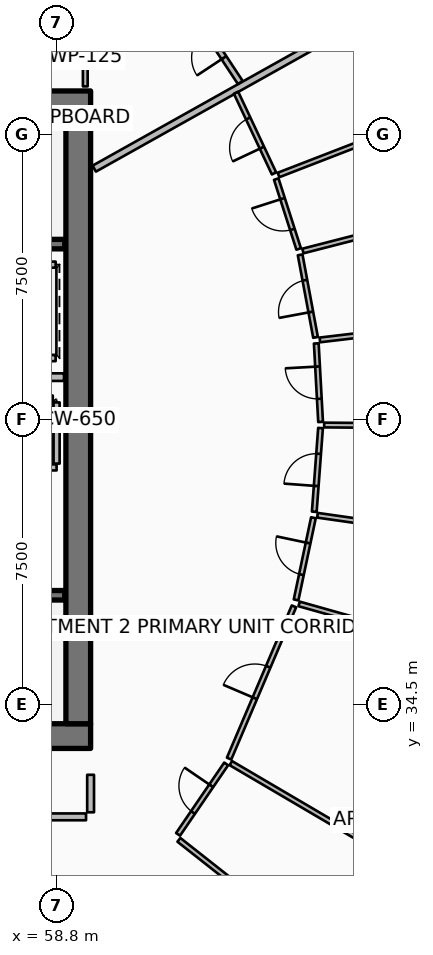
"""IFC4 building model, lengths in metres.
Left out: names, types, materials, properties, quantities, classifications, styles, units other than length and angle.
Written with IfcOpenShell. Run it as: python <this file> out.ifc"""

import sys

from ifc_helpers import new_model, si_unit, direction, frame, frame_2d, origin, place, context, subcontext, project, spatial, rectangle, extrude, element, fill, save


model = new_model("IFC4")
c1 = context("Model", 3, precision=1e-05, world=origin(), true_north=direction((0.0, 1.0)))
c2 = subcontext(c1, "Body", "Model", "MODEL_VIEW")
j1 = project(units=[si_unit("LENGTHUNIT", "METRE"), si_unit("PLANEANGLEUNIT", "RADIAN")], contexts=[c1])
p1 = place(None, origin())
s1 = spatial("IfcSite", under=j1, at=p1, CompositionType="ELEMENT")
p2 = place(p1, origin())
s2 = spatial("IfcBuilding", under=s1, at=p2, CompositionType="ELEMENT")
p3 = place(p2, frame((0.0, 0.0, 248.25)))
s3 = spatial("IfcBuildingStorey", under=s2, at=p3, CompositionType="ELEMENT", Elevation=248.25)
for number, where, z_axis, x_axis in (
    (1, (49.95, 33.675, 0.0), (0.0, 0.0, 1.0), (1.0, 0.0, 0.0)),
    (2, (49.95, 50.325, 0.0), (0.0, 0.0, 1.0), (1.0, 0.0, 0.0)),
):
    element("IfcWall", number, at=place(p3, frame(where, z_axis=z_axis, x_axis=x_axis)), inside=s3, PredefinedType="SHEAR", context=c2, shape_type="SweptSolid", body=[
        extrude(rectangle(XDim=9.75, YDim=0.65, at=frame_2d((4.875, 0.0))), origin(), (0.0, 0.0, 1.0), 3.85),
    ])
p4 = place(p3, frame((59.375, 34.0, 0.0), z_axis=(0.0, 0.0, 1.0), x_axis=(0.0, 1.0, 0.0)))
e3 = element("IfcWall", 3, at=p4, inside=s3, PredefinedType="SHEAR", context=c2, shape_type="SweptSolid", body=[
    extrude(rectangle(XDim=16.0, YDim=0.65, at=frame_2d((8.0, 0.0))), origin(), (0.0, 0.0, 1.0), 3.85),
])
p5 = place(p3, frame((51.48, 46.62, 0.0), z_axis=(0.0, 0.0, 1.0), x_axis=(1.0, 0.0, 0.0)))
e4 = element("IfcWall", 4, at=p5, inside=s3, PredefinedType="SOLIDWALL", context=c2, shape_type="SweptSolid", body=[
    extrude(rectangle(XDim=7.54, YDim=0.25, at=frame_2d((3.77, 0.0))), origin(), (0.0, 0.0, 1.0), 3.59),
])
p6 = place(p5, frame((0.3, 0.0, 0.0)))
e5 = element("IfcOpeningElement", 5, at=p6, cuts=e4, PredefinedType="OPENING", context=c2, shape_type="SweptSolid", body=[
    extrude(rectangle(XDim=1.55, YDim=2.15, at=frame_2d((0.775, 1.075))), frame((0.0, 0.135, 0.0), z_axis=(0.0, -1.0, 0.0), x_axis=(1.0, 0.0, 0.0)), (0.0, 0.0, 1.0), 0.27),
])
p7 = place(p3, frame((51.48, 37.38, 0.0), z_axis=(0.0, 0.0, 1.0), x_axis=(1.0, 0.0, 0.0)))
e6 = element("IfcWall", 6, at=p7, inside=s3, PredefinedType="SOLIDWALL", context=c2, shape_type="SweptSolid", body=[
    extrude(rectangle(XDim=7.54, YDim=0.25, at=frame_2d((3.77, 0.0))), origin(), (0.0, 0.0, 1.0), 3.59),
])
p8 = place(p7, frame((0.3, 0.0, 0.0)))
e7 = element("IfcOpeningElement", 7, at=p8, cuts=e6, PredefinedType="OPENING", context=c2, shape_type="SweptSolid", body=[
    extrude(rectangle(XDim=1.55, YDim=2.15, at=frame_2d((0.775, 1.075))), frame((0.0, 0.135, 0.0), z_axis=(0.0, -1.0, 0.0), x_axis=(1.0, 0.0, 0.0)), (0.0, 0.0, 1.0), 0.27),
])
p9 = place(p3, frame((58.805, 40.745, 0.0), z_axis=(0.0, 0.0, 1.0), x_axis=(-1.0, 0.0, 0.0)))
e8 = element("IfcWall", 8, at=p9, inside=s3, PredefinedType="PARTITIONING", context=c2, shape_type="SweptSolid", body=[
    extrude(rectangle(XDim=2.11, YDim=0.16, at=frame_2d((1.055, 0.0))), origin(), (0.0, 0.0, 1.0), 3.59),
])
p10 = place(p9, frame((0.505, 0.0, 0.0)))
e9 = element("IfcOpeningElement", 9, at=p10, cuts=e8, PredefinedType="OPENING", context=c2, shape_type="SweptSolid", body=[
    extrude(rectangle(XDim=1.1, YDim=2.1, at=frame_2d((0.55, 1.05))), frame((0.0, 0.09, 0.0), z_axis=(0.0, -1.0, 0.0), x_axis=(1.0, 0.0, 0.0)), (0.0, 0.0, 1.0), 0.18),
])
p11 = place(p3, frame((58.805, 40.845, 0.0), z_axis=(0.0, 0.0, 1.0), x_axis=(0.0, 1.0, 0.0)))
e10 = element("IfcWall", 10, at=p11, inside=s3, PredefinedType="PARTITIONING", context=c2, shape_type="SweptSolid", body=[
    extrude(rectangle(XDim=1.61, YDim=0.16, at=frame_2d((0.805, 0.0))), origin(), (0.0, 0.0, 1.0), 3.59),
])
p12 = place(p3, frame((56.795, 42.555, 0.0), z_axis=(0.0, 0.0, 1.0), x_axis=(1.0, 0.0, 0.0)))
e11 = element("IfcWall", 11, at=p12, inside=s3, PredefinedType="PARTITIONING", context=c2, shape_type="SweptSolid", body=[
    extrude(rectangle(XDim=1.91, YDim=0.16, at=frame_2d((0.955, 0.0))), origin(), (0.0, 0.0, 1.0), 3.59),
])
for number, where, z_axis, x_axis in (
    (12, (56.72, 46.08, 0.0), (0.0, 0.0, 1.0), (1.0, 0.0, 0.0)),
    (13, (56.72, 43.62, 0.0), (0.0, 0.0, 1.0), (1.0, 0.0, 0.0)),
):
    element("IfcWall", number, at=place(p3, frame(where, z_axis=z_axis, x_axis=x_axis)), inside=s3, PredefinedType="PARTITIONING", context=c2, shape_type="SweptSolid", body=[
        extrude(rectangle(XDim=2.06, YDim=0.16, at=frame_2d((1.03, 0.0))), origin(), (0.0, 0.0, 1.0), 3.59),
    ])
p13 = place(p3, frame((50.12, 43.12, 0.0), z_axis=(0.0, 0.0, 1.0), x_axis=(1.0, 0.0, 0.0)))
e14 = element("IfcWall", 14, at=p13, inside=s3, PredefinedType="PARTITIONING", context=c2, shape_type="SweptSolid", body=[
    extrude(rectangle(XDim=8.88, YDim=0.2, at=frame_2d((4.44, 0.0))), origin(), (0.0, 0.0, 1.0), 3.59),
])
p14 = place(p3, frame((59.56, 50.77, 0.0), z_axis=(0.0, 0.0, 1.0), x_axis=(0.0, 1.0, 0.0)))
e15 = element("IfcWall", 15, at=p14, inside=s3, PredefinedType="PARTITIONING", context=c2, shape_type="SweptSolid", body=[
    extrude(rectangle(XDim=1.54, YDim=0.125, at=frame_2d((0.77, 0.0))), origin(), (0.0, 0.0, 1.0), 3.03),
])
p15 = place(p3, frame((59.796, 48.606, 0.0), z_axis=(0.0, 0.0, 1.0), x_axis=(0.872493213488, 0.488626229767, 0.0)))
e16 = element("IfcWall", 16, at=p15, inside=s3, PredefinedType="PARTITIONING", context=c2, shape_type="SweptSolid", body=[
    extrude(rectangle(XDim=16.91, YDim=0.18, at=frame_2d((8.455, 0.0))), origin(), (0.0, 0.0, 1.0), 2.957),
])
p16 = place(p3, frame((63.639, 50.872, 0.0), z_axis=(0.0, 0.0, 1.0), x_axis=(-0.550539267926, 0.834809268319, 0.0)))
e17 = element("IfcWall", 17, at=p16, inside=s3, PredefinedType="PARTITIONING", context=c2, shape_type="SweptSolid", body=[
    extrude(rectangle(XDim=2.414, YDim=0.15, at=frame_2d((1.207, 0.0))), origin(), (0.0, 0.0, 1.0), 2.957),
])
p17 = place(p16, frame((0.782, 0.0, 0.0)))
e18 = element("IfcOpeningElement", 18, at=p17, cuts=e17, PredefinedType="OPENING", context=c2, shape_type="SweptSolid", body=[
    extrude(rectangle(XDim=0.85, YDim=2.06, at=frame_2d((0.425, 1.03))), frame((0.0, 0.085, 0.0), z_axis=(0.0, -1.0, 0.0), x_axis=(1.0, 0.0, 0.0)), (0.0, 0.0, 1.0), 0.17),
])
p18 = place(p3, frame((53.972, 31.55, 0.0), z_axis=(0.0, 0.0, 1.0), x_axis=(1.0, 0.0, 0.0)))
e19 = element("IfcWall", 19, at=p18, inside=s3, PredefinedType="PARTITIONING", context=c2, shape_type="SweptSolid", body=[
    extrude(rectangle(XDim=5.608, YDim=0.18, at=frame_2d((2.804, 0.0))), origin(), (0.0, 0.0, 1.0), 2.957),
])
p19 = place(p18, frame((2.254, 0.0, 0.0)))
e20 = element("IfcOpeningElement", 20, at=p19, cuts=e19, PredefinedType="OPENING", context=c2, shape_type="SweptSolid", body=[
    extrude(rectangle(XDim=1.1, YDim=2.1, at=frame_2d((0.55, 1.05))), frame((0.0, 0.1, 0.0), z_axis=(0.0, -1.0, 0.0), x_axis=(1.0, 0.0, 0.0)), (0.0, 0.0, 1.0), 0.2),
])
p20 = place(p3, frame((59.7, 31.67, 0.0), z_axis=(0.0, 0.0, 1.0), x_axis=(0.0, 1.0, 0.0)))
e21 = element("IfcWall", 21, at=p20, inside=s3, PredefinedType="PARTITIONING", context=c2, shape_type="SweptSolid", body=[
    extrude(rectangle(XDim=0.987, YDim=0.18, at=frame_2d((0.493, 0.0))), origin(), (0.0, 0.0, 1.0), 2.957),
])
p21 = place(p3, frame((62.023, 30.945, 0.0), z_axis=(0.0, 0.0, 1.0), x_axis=(0.785322102606, -0.619087388952, 0.0)))
e22 = element("IfcWall", 22, at=p21, inside=s3, PredefinedType="PARTITIONING", context=c2, shape_type="SweptSolid", body=[
    extrude(rectangle(XDim=9.228, YDim=0.125, at=frame_2d((4.614, 0.0))), origin(), (0.0, 0.0, 1.0), 2.957),
])
p22 = place(p3, frame((63.39, 32.963, 0.0), z_axis=(0.0, 0.0, 1.0), x_axis=(0.862331921897, -0.506343417532, 0.0)))
e23 = element("IfcWall", 23, at=p22, inside=s3, PredefinedType="PARTITIONING", context=c2, shape_type="SweptSolid", body=[
    extrude(rectangle(XDim=9.478, YDim=0.125, at=frame_2d((4.739, 0.0))), origin(), (0.0, 0.0, 1.0), 3.03),
])
p23 = place(p3, frame((62.001, 31.089, 0.0), z_axis=(0.0, 0.0, 1.0), x_axis=(0.564052095913, 0.825739204044, 0.0)))
e24 = element("IfcWall", 24, at=p23, inside=s3, PredefinedType="PARTITIONING", context=c2, shape_type="SweptSolid", body=[
    extrude(rectangle(XDim=2.245, YDim=0.125, at=frame_2d((1.122, 0.0))), origin(), (0.0, 0.0, 1.0), 2.957),
])
p24 = place(p23, frame((0.698, 0.0, 0.0)))
e25 = element("IfcOpeningElement", 25, at=p24, cuts=e24, PredefinedType="OPENING", context=c2, shape_type="SweptSolid", body=[
    extrude(rectangle(XDim=0.85, YDim=2.06, at=frame_2d((0.425, 1.03))), frame((0.0, 0.073, 0.0), z_axis=(0.0, -1.0, 0.0), x_axis=(1.0, 0.0, 0.0)), (0.0, 0.0, 1.0), 0.145),
])
p25 = place(p3, frame((63.344, 33.083, 0.0), z_axis=(0.0, 0.0, 1.0), x_axis=(0.392064212371, 0.919937852998, 0.0)))
e26 = element("IfcWall", 26, at=p25, inside=s3, PredefinedType="PARTITIONING", context=c2, shape_type="SweptSolid", body=[
    extrude(rectangle(XDim=4.354, YDim=0.125, at=frame_2d((2.177, 0.0))), origin(), (0.0, 0.0, 1.0), 2.957),
])
p26 = place(p25, frame((1.727, 0.0, 0.0)))
e27 = element("IfcOpeningElement", 27, at=p26, cuts=e26, PredefinedType="OPENING", context=c2, shape_type="SweptSolid", body=[
    extrude(rectangle(XDim=0.9, YDim=2.08, at=frame_2d((0.45, 1.04))), frame((0.0, 0.073, 0.0), z_axis=(0.0, -1.0, 0.0), x_axis=(1.0, 0.0, 0.0)), (0.0, 0.0, 1.0), 0.145),
])
p27 = place(p3, frame((65.187, 37.153, 0.0), z_axis=(0.0, 0.0, 1.0), x_axis=(0.962455577867, -0.271439239301, 0.0)))
e28 = element("IfcWall", 28, at=p27, inside=s3, PredefinedType="PARTITIONING", context=c2, shape_type="SweptSolid", body=[
    extrude(rectangle(XDim=11.639, YDim=0.125, at=frame_2d((5.819, 0.0))), origin(), (0.0, 0.0, 1.0), 2.957),
])
p28 = place(p3, frame((65.669, 39.485, 0.0), z_axis=(0.0, 0.0, 1.0), x_axis=(0.990022432034, -0.140909843761, 0.0)))
e29 = element("IfcWall", 29, at=p28, inside=s3, PredefinedType="PARTITIONING", context=c2, shape_type="SweptSolid", body=[
    extrude(rectangle(XDim=11.761, YDim=0.125, at=frame_2d((5.88, 0.0))), origin(), (0.0, 0.0, 1.0), 3.03),
])
p29 = place(p3, frame((65.846, 41.86, 0.0), z_axis=(0.0, 0.0, 1.0), x_axis=(0.999969162233, -0.007853316706, 0.0)))
e30 = element("IfcWall", 30, at=p29, inside=s3, PredefinedType="PARTITIONING", context=c2, shape_type="SweptSolid", body=[
    extrude(rectangle(XDim=12.311, YDim=0.125, at=frame_2d((6.155, 0.0))), origin(), (0.0, 0.0, 1.0), 3.03),
])
p30 = place(p3, frame((65.107, 37.258, 0.0), z_axis=(0.0, 0.0, 1.0), x_axis=(0.20677346991, 0.978388845062, 0.0)))
e31 = element("IfcWall", 31, at=p30, inside=s3, PredefinedType="PARTITIONING", context=c2, shape_type="SweptSolid", body=[
    extrude(rectangle(XDim=2.209, YDim=0.125, at=frame_2d((1.104, 0.0))), origin(), (0.0, 0.0, 1.0), 2.957),
])
p31 = place(p30, frame((0.68, 0.0, 0.0)))
e32 = element("IfcOpeningElement", 32, at=p31, cuts=e31, PredefinedType="OPENING", context=c2, shape_type="SweptSolid", body=[
    extrude(rectangle(XDim=0.85, YDim=2.06, at=frame_2d((0.425, 1.03))), frame((0.0, 0.073, 0.0), z_axis=(0.0, -1.0, 0.0), x_axis=(1.0, 0.0, 0.0)), (0.0, 0.0, 1.0), 0.145),
])
p32 = place(p3, frame((65.586, 39.578, 0.0), z_axis=(0.0, 0.0, 1.0), x_axis=(0.074490462528, 0.997221726093, 0.0)))
e33 = element("IfcWall", 33, at=p32, inside=s3, PredefinedType="PARTITIONING", context=c2, shape_type="SweptSolid", body=[
    extrude(rectangle(XDim=2.209, YDim=0.125, at=frame_2d((1.104, 0.0))), origin(), (0.0, 0.0, 1.0), 3.03),
])
p33 = place(p32, frame((0.679, 0.0, 0.0)))
e34 = element("IfcOpeningElement", 34, at=p33, cuts=e33, PredefinedType="OPENING", context=c2, shape_type="SweptSolid", body=[
    extrude(rectangle(XDim=0.85, YDim=2.06, at=frame_2d((0.425, 1.03))), frame((0.0, 0.073, 0.0), z_axis=(0.0, -1.0, 0.0), x_axis=(1.0, 0.0, 0.0)), (0.0, 0.0, 1.0), 0.145),
])
p34 = place(p3, frame((65.752, 41.94, 0.0), z_axis=(0.0, 0.0, 1.0), x_axis=(-0.055084577693, 0.998481692021, 0.0)))
e35 = element("IfcWall", 35, at=p34, inside=s3, PredefinedType="PARTITIONING", context=c2, shape_type="SweptSolid", body=[
    extrude(rectangle(XDim=2.07, YDim=0.125, at=frame_2d((1.035, 0.0))), origin(), (0.0, 0.0, 1.0), 2.957),
])
p35 = place(p34, frame((0.61, 0.0, 0.0)))
e36 = element("IfcOpeningElement", 36, at=p35, cuts=e35, PredefinedType="OPENING", context=c2, shape_type="SweptSolid", body=[
    extrude(rectangle(XDim=0.85, YDim=2.06, at=frame_2d((0.425, 1.03))), frame((0.0, 0.073, 0.0), z_axis=(0.0, -1.0, 0.0), x_axis=(1.0, 0.0, 0.0)), (0.0, 0.0, 1.0), 0.145),
])
p36 = place(p3, frame((65.733, 44.099, 0.0), z_axis=(0.0, 0.0, 1.0), x_axis=(0.99306831242, 0.117538618625, 0.0)))
e37 = element("IfcWall", 37, at=p36, inside=s3, PredefinedType="PARTITIONING", context=c2, shape_type="SweptSolid", body=[
    extrude(rectangle(XDim=12.573, YDim=0.125, at=frame_2d((6.286, 0.0))), origin(), (0.0, 0.0, 1.0), 2.957),
])
p37 = place(p3, frame((65.286, 46.438, 0.0), z_axis=(0.0, 0.0, 1.0), x_axis=(0.968583991447, 0.248686653265, 0.0)))
e38 = element("IfcWall", 38, at=p37, inside=s3, PredefinedType="PARTITIONING", context=c2, shape_type="SweptSolid", body=[
    extrude(rectangle(XDim=12.056, YDim=0.125, at=frame_2d((6.028, 0.0))), origin(), (0.0, 0.0, 1.0), 3.03),
])
p38 = place(p3, frame((64.645, 48.439, 0.0), z_axis=(0.0, 0.0, 1.0), x_axis=(0.93263897003, 0.360810963778, 0.0)))
e39 = element("IfcWall", 39, at=p38, inside=s3, PredefinedType="PARTITIONING", context=c2, shape_type="SweptSolid", body=[
    extrude(rectangle(XDim=12.043, YDim=0.125, at=frame_2d((6.021, 0.0))), origin(), (0.0, 0.0, 1.0), 3.03),
])
p39 = place(p3, frame((65.619, 44.166, 0.0), z_axis=(0.0, 0.0, 1.0), x_axis=(-0.183454395516, 0.983028221755, 0.0)))
e40 = element("IfcWall", 40, at=p39, inside=s3, PredefinedType="PARTITIONING", context=c2, shape_type="SweptSolid", body=[
    extrude(rectangle(XDim=2.209, YDim=0.125, at=frame_2d((1.104, 0.0))), origin(), (0.0, 0.0, 1.0), 2.957),
])
p40 = place(p39, frame((0.68, 0.0, 0.0)))
e41 = element("IfcOpeningElement", 41, at=p40, cuts=e40, PredefinedType="OPENING", context=c2, shape_type="SweptSolid", body=[
    extrude(rectangle(XDim=0.85, YDim=2.06, at=frame_2d((0.425, 1.03))), frame((0.0, 0.073, 0.0), z_axis=(0.0, -1.0, 0.0), x_axis=(1.0, 0.0, 0.0)), (0.0, 0.0, 1.0), 0.145),
])
p41 = place(p3, frame((65.175, 46.492, 0.0), z_axis=(0.0, 0.0, 1.0), x_axis=(-0.305358332679, 0.952237516938, 0.0)))
e42 = element("IfcWall", 42, at=p41, inside=s3, PredefinedType="PARTITIONING", context=c2, shape_type="SweptSolid", body=[
    extrude(rectangle(XDim=1.931, YDim=0.125, at=frame_2d((0.965, 0.0))), origin(), (0.0, 0.0, 1.0), 3.03),
])
p42 = place(p41, frame((0.54, 0.0, 0.0)))
e43 = element("IfcOpeningElement", 43, at=p42, cuts=e42, PredefinedType="OPENING", context=c2, shape_type="SweptSolid", body=[
    extrude(rectangle(XDim=0.85, YDim=2.06, at=frame_2d((0.425, 1.03))), frame((0.0, 0.073, 0.0), z_axis=(0.0, -1.0, 0.0), x_axis=(1.0, 0.0, 0.0)), (0.0, 0.0, 1.0), 0.145),
])
p43 = place(p3, frame((64.527, 48.479, 0.0), z_axis=(0.0, 0.0, 1.0), x_axis=(-0.425751972865, 0.904839907167, 0.0)))
e44 = element("IfcWall", 44, at=p43, inside=s3, PredefinedType="PARTITIONING", context=c2, shape_type="SweptSolid", body=[
    extrude(rectangle(XDim=2.348, YDim=0.125, at=frame_2d((1.174, 0.0))), origin(), (0.0, 0.0, 1.0), 2.957),
])
p44 = place(p43, frame((0.749, 0.0, 0.0)))
e45 = element("IfcOpeningElement", 45, at=p44, cuts=e44, PredefinedType="OPENING", context=c2, shape_type="SweptSolid", body=[
    extrude(rectangle(XDim=0.85, YDim=2.06, at=frame_2d((0.425, 1.03))), frame((0.0, 0.073, 0.0), z_axis=(0.0, -1.0, 0.0), x_axis=(1.0, 0.0, 0.0)), (0.0, 0.0, 1.0), 0.145),
])
p45 = place(p17, origin())
e46 = element("IfcDoor", 46, at=p45, inside=s3, OperationType="SINGLE_SWING_LEFT", PredefinedType="DOOR", context=c2, shape_type="SweptSolid", body=[
    extrude(rectangle(XDim=0.85, YDim=2.06, at=frame_2d((0.425, 1.03))), frame((0.0, 0.025, 0.0), z_axis=(0.0, -1.0, 0.0), x_axis=(1.0, 0.0, 0.0)), (0.0, 0.0, 1.0), 0.05),
])
fill(e18, e46)
p46 = place(p24, origin())
e47 = element("IfcDoor", 47, at=p46, inside=s3, OperationType="SINGLE_SWING_RIGHT", PredefinedType="DOOR", context=c2, shape_type="SweptSolid", body=[
    extrude(rectangle(XDim=0.85, YDim=2.06, at=frame_2d((0.425, 1.03))), frame((0.0, 0.025, 0.0), z_axis=(0.0, -1.0, 0.0), x_axis=(1.0, 0.0, 0.0)), (0.0, 0.0, 1.0), 0.05),
])
fill(e25, e47)
p47 = place(p26, origin())
e48 = element("IfcDoor", 48, at=p47, inside=s3, OperationType="SINGLE_SWING_LEFT", PredefinedType="DOOR", context=c2, shape_type="SweptSolid", body=[
    extrude(rectangle(XDim=0.9, YDim=2.08, at=frame_2d((0.45, 1.04))), frame((0.0, 0.025, 0.0), z_axis=(0.0, -1.0, 0.0), x_axis=(1.0, 0.0, 0.0)), (0.0, 0.0, 1.0), 0.05),
])
fill(e27, e48)
p48 = place(p31, origin())
e49 = element("IfcDoor", 49, at=p48, inside=s3, OperationType="SINGLE_SWING_RIGHT", PredefinedType="DOOR", context=c2, shape_type="SweptSolid", body=[
    extrude(rectangle(XDim=0.85, YDim=2.06, at=frame_2d((0.425, 1.03))), frame((0.0, 0.025, 0.0), z_axis=(0.0, -1.0, 0.0), x_axis=(1.0, 0.0, 0.0)), (0.0, 0.0, 1.0), 0.05),
])
fill(e32, e49)
p49 = place(p33, origin())
e50 = element("IfcDoor", 50, at=p49, inside=s3, OperationType="SINGLE_SWING_LEFT", PredefinedType="DOOR", context=c2, shape_type="SweptSolid", body=[
    extrude(rectangle(XDim=0.85, YDim=2.06, at=frame_2d((0.425, 1.03))), frame((0.0, 0.025, 0.0), z_axis=(0.0, -1.0, 0.0), x_axis=(1.0, 0.0, 0.0)), (0.0, 0.0, 1.0), 0.05),
])
fill(e34, e50)
p50 = place(p35, origin())
e51 = element("IfcDoor", 51, at=p50, inside=s3, OperationType="SINGLE_SWING_RIGHT", PredefinedType="DOOR", context=c2, shape_type="SweptSolid", body=[
    extrude(rectangle(XDim=0.85, YDim=2.06, at=frame_2d((0.425, 1.03))), frame((0.0, 0.025, 0.0), z_axis=(0.0, -1.0, 0.0), x_axis=(1.0, 0.0, 0.0)), (0.0, 0.0, 1.0), 0.05),
])
fill(e36, e51)
p51 = place(p40, origin())
e52 = element("IfcDoor", 52, at=p51, inside=s3, OperationType="SINGLE_SWING_LEFT", PredefinedType="DOOR", context=c2, shape_type="SweptSolid", body=[
    extrude(rectangle(XDim=0.85, YDim=2.06, at=frame_2d((0.425, 1.03))), frame((0.0, 0.025, 0.0), z_axis=(0.0, -1.0, 0.0), x_axis=(1.0, 0.0, 0.0)), (0.0, 0.0, 1.0), 0.05),
])
fill(e41, e52)
p52 = place(p42, origin())
e53 = element("IfcDoor", 53, at=p52, inside=s3, OperationType="SINGLE_SWING_RIGHT", PredefinedType="DOOR", context=c2, shape_type="SweptSolid", body=[
    extrude(rectangle(XDim=0.85, YDim=2.06, at=frame_2d((0.425, 1.03))), frame((0.0, 0.025, 0.0), z_axis=(0.0, -1.0, 0.0), x_axis=(1.0, 0.0, 0.0)), (0.0, 0.0, 1.0), 0.05),
])
fill(e43, e53)
p53 = place(p44, origin())
e54 = element("IfcDoor", 54, at=p53, inside=s3, OperationType="SINGLE_SWING_LEFT", PredefinedType="DOOR", context=c2, shape_type="SweptSolid", body=[
    extrude(rectangle(XDim=0.85, YDim=2.06, at=frame_2d((0.425, 1.03))), frame((0.0, 0.025, 0.0), z_axis=(0.0, -1.0, 0.0), x_axis=(1.0, 0.0, 0.0)), (0.0, 0.0, 1.0), 0.05),
])
fill(e45, e54)
save(model, sys.argv[1])
